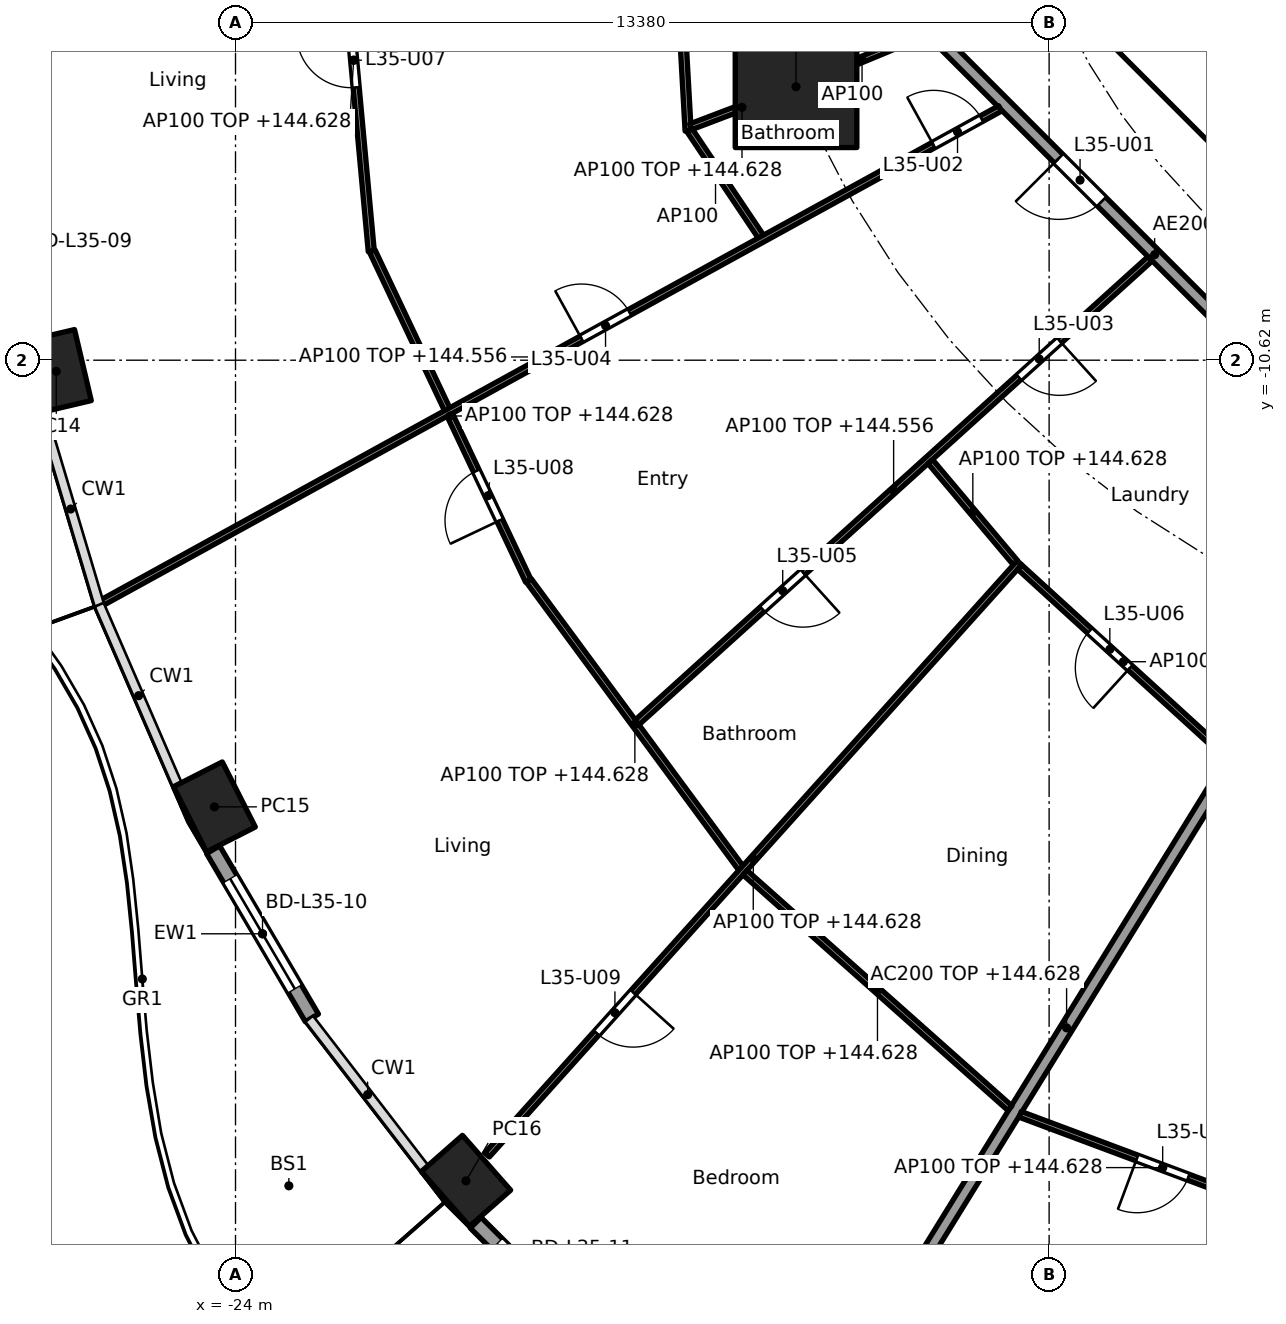
"""IFC4 building model, lengths in metres.
Left out: names, types, materials, properties, quantities, classifications, styles, units other than length and angle.
Written with IfcOpenShell. Run it as: python <this file> out.ifc"""

import sys

from ifc_helpers import new_model, si_unit, direction, frame, frame_2d, origin, origin_2d, place, context, subcontext, project, spatial, rectangle, hollow_rectangle, extrude, element, fill, save


model = new_model("IFC4")
c1 = context("Model", 3, precision=1e-05, world=origin(), true_north=direction((0.0, 1.0)))
c2 = subcontext(c1, "Body", "Model", "MODEL_VIEW")
j1 = project(units=[si_unit("LENGTHUNIT", "METRE"), si_unit("PLANEANGLEUNIT", "RADIAN")], contexts=[c1])
p1 = place(None, origin())
s1 = spatial("IfcSite", under=j1, at=p1, CompositionType="ELEMENT")
p2 = place(p1, origin())
s2 = spatial("IfcBuilding", under=s1, at=p2, CompositionType="ELEMENT")
p3 = place(p2, frame((0.0, 0.0, 141.8)))
s3 = spatial("IfcBuildingStorey", under=s2, at=p3, CompositionType="ELEMENT", Elevation=141.8)
for number, where, z_axis, x_axis in (
    (1, (-26.948, -10.803, 0.0), (0.0, 0.0, 1.0), (0.229, -0.973, 0.0)),
    (2, (-24.347, -17.965, 0.0), (0.0, 0.0, 1.0), (0.452, -0.892, 0.0)),
    (3, (-20.209, -24.115, 0.0), (0.0, 0.0, 1.0), (0.66, -0.751, 0.0)),
):
    element("IfcColumn", number, at=place(p3, frame(where, z_axis=z_axis, x_axis=x_axis)), inside=s3, PredefinedType="COLUMN", context=c2, shape_type="SweptSolid", body=[
        extrude(hollow_rectangle(XDim=1.2, YDim=0.9, WallThickness=0.04, at=origin_2d()), origin(), (0.0, 0.0, 1.0), 3.7),
    ])
p4 = place(p3, frame((-14.782, -6.123, 0.0), z_axis=(0.0, 0.0, 1.0), x_axis=(1.0, 0.0, 0.0)))
e4 = element("IfcColumn", 4, at=p4, inside=s3, PredefinedType="COLUMN", context=c2, shape_type="SweptSolid", body=[
    extrude(rectangle(XDim=2.0, YDim=2.0, at=origin_2d()), origin(), (0.0, 0.0, 1.0), 3.7),
])
p5 = place(p3, frame((-22.744, -21.436, 0.0), z_axis=(0.0, 0.0, 1.0), x_axis=(-0.506314982873, 0.862348617508, 0.0)))
e5 = element("IfcWall", 5, at=p5, inside=s3, PredefinedType="SOLIDWALL", context=c2, shape_type="SweptSolid", body=[
    extrude(rectangle(XDim=3.208, YDim=0.25, at=frame_2d((1.604, 0.0))), origin(), (0.0, 0.0, 1.0), 3.44),
])
p6 = place(p5, frame((0.554, 0.0, 0.0)))
e6 = element("IfcOpeningElement", 6, at=p6, cuts=e5, PredefinedType="OPENING", context=c2, shape_type="SweptSolid", body=[
    extrude(rectangle(XDim=2.1, YDim=2.4, at=frame_2d((1.05, 1.2))), frame((0.0, 0.135, 0.0), z_axis=(0.0, -1.0, 0.0), x_axis=(1.0, 0.0, 0.0)), (0.0, 0.0, 1.0), 0.27),
])
p7 = place(p3, frame((-17.865, -26.985, 0.0), z_axis=(0.0, 0.0, 1.0), x_axis=(-0.707818274975, 0.706394570768, 0.0)))
e7 = element("IfcWall", 7, at=p7, inside=s3, PredefinedType="SOLIDWALL", context=c2, shape_type="SweptSolid", body=[
    extrude(rectangle(XDim=3.087, YDim=0.25, at=frame_2d((1.543, 0.0))), origin(), (0.0, 0.0, 1.0), 3.44),
])
p8 = place(p7, frame((0.493, 0.0, 0.0)))
e8 = element("IfcOpeningElement", 8, at=p8, cuts=e7, PredefinedType="OPENING", context=c2, shape_type="SweptSolid", body=[
    extrude(rectangle(XDim=2.1, YDim=2.4, at=frame_2d((1.05, 1.2))), frame((0.0, 0.135, 0.0), z_axis=(0.0, -1.0, 0.0), x_axis=(1.0, 0.0, 0.0)), (0.0, 0.0, 1.0), 0.27),
])
p9 = place(p3, frame((-9.988, -4.613, 0.0), z_axis=(0.0, 0.0, 1.0), x_axis=(0.707106781187, -0.707106781187, 0.0)))
e9 = element("IfcWall", 9, at=p9, inside=s3, PredefinedType="SHEAR", context=c2, shape_type="SweptSolid", body=[
    extrude(rectangle(XDim=7.602, YDim=0.6, at=frame_2d((3.801, 0.0))), origin(), (0.0, 0.0, 1.0), 3.44),
])
p10 = place(p9, frame((6.151, 0.0, 0.0)))
e10 = element("IfcOpeningElement", 10, at=p10, cuts=e9, PredefinedType="OPENING", context=c2, shape_type="SweptSolid", body=[
    extrude(rectangle(XDim=1.1, YDim=2.1, at=frame_2d((0.55, 1.05))), frame((0.0, 0.31, 0.0), z_axis=(0.0, -1.0, 0.0), x_axis=(1.0, 0.0, 0.0)), (0.0, 0.0, 1.0), 0.62),
])
p11 = place(p3, frame((-6.149, -14.825, 0.0), z_axis=(0.0, 0.0, 1.0), x_axis=(-0.525406383516, -0.85085141603, 0.0)))
e11 = element("IfcWall", 11, at=p11, inside=s3, PredefinedType="PARTITIONING", context=c2, shape_type="SweptSolid", body=[
    extrude(rectangle(XDim=15.925, YDim=0.2, at=frame_2d((7.962, 0.0))), origin(), (0.0, 0.0, 1.0), 2.828),
])
p12 = place(p3, frame((-12.635, -5.134, 0.0), z_axis=(0.0, 0.0, 1.0), x_axis=(0.707106781187, -0.707106781187, 0.0)))
e12 = element("IfcWall", 12, at=p12, inside=s3, PredefinedType="PARTITIONING", context=c2, shape_type="SweptSolid", body=[
    extrude(rectangle(XDim=10.609, YDim=0.2, at=frame_2d((5.305, 0.0))), origin(), (0.0, 0.0, 1.0), 3.44),
])
p13 = place(p12, frame((3.07, 0.0, 0.0)))
e13 = element("IfcOpeningElement", 13, at=p13, cuts=e12, PredefinedType="OPENING", context=c2, shape_type="SweptSolid", body=[
    extrude(rectangle(XDim=1.0, YDim=2.1, at=frame_2d((0.5, 1.05))), frame((0.0, 0.11, 0.0), z_axis=(0.0, -1.0, 0.0), x_axis=(1.0, 0.0, 0.0)), (0.0, 0.0, 1.0), 0.22),
])
p14 = place(p3, frame((-16.825, -2.058, 0.0), z_axis=(0.0, 0.0, 1.0), x_axis=(0.055971643802, -0.998432358796, 0.0)))
e14 = element("IfcWall", 14, at=p14, inside=s3, PredefinedType="PARTITIONING", context=c2, shape_type="SweptSolid", body=[
    extrude(rectangle(XDim=4.798, YDim=0.1, at=frame_2d((2.399, 0.0))), origin(), (0.0, 0.0, 1.0), 2.828),
])
p15 = place(p3, frame((-22.347, -2.542, 0.0), z_axis=(0.0, 0.0, 1.0), x_axis=(0.091783634244, -0.995778973711, 0.0)))
e15 = element("IfcWall", 15, at=p15, inside=s3, PredefinedType="PARTITIONING", context=c2, shape_type="SweptSolid", body=[
    extrude(rectangle(XDim=6.315, YDim=0.1, at=frame_2d((3.157, 0.0))), origin(), (0.0, 0.0, 1.0), 2.828),
])
p16 = place(p15, frame((2.708, 0.0, 0.0)))
e16 = element("IfcOpeningElement", 16, at=p16, cuts=e15, PredefinedType="OPENING", context=c2, shape_type="SweptSolid", body=[
    extrude(rectangle(XDim=0.9, YDim=2.1, at=frame_2d((0.45, 1.05))), frame((0.0, 0.06, 0.0), z_axis=(0.0, -1.0, 0.0), x_axis=(1.0, 0.0, 0.0)), (0.0, 0.0, 1.0), 0.12),
])
p17 = place(p3, frame((-12.657, -5.243, 0.0), z_axis=(0.0, 0.0, 1.0), x_axis=(-0.923864733477, -0.382719158442, 0.0)))
e17 = element("IfcWall", 17, at=p17, inside=s3, PredefinedType="PARTITIONING", context=c2, shape_type="SweptSolid", body=[
    extrude(rectangle(XDim=2.25, YDim=0.1, at=frame_2d((1.125, 0.0))), origin(), (0.0, 0.0, 1.0), 3.44),
])
p18 = place(p3, frame((-14.829, -6.141, 0.0), z_axis=(0.0, 0.0, 1.0), x_axis=(-0.934704367514, -0.355426146128, 0.0)))
e18 = element("IfcWall", 18, at=p18, inside=s3, PredefinedType="PARTITIONING", context=c2, shape_type="SweptSolid", body=[
    extrude(rectangle(XDim=1.802, YDim=0.1, at=frame_2d((0.901, 0.0))), origin(), (0.0, 0.0, 1.0), 2.828),
])
p19 = place(p3, frame((-16.532, -6.84, 0.0), z_axis=(0.0, 0.0, 1.0), x_axis=(0.556994773624, -0.830515997531, 0.0)))
e19 = element("IfcWall", 19, at=p19, inside=s3, PredefinedType="PARTITIONING", context=c2, shape_type="SweptSolid", body=[
    extrude(rectangle(XDim=2.183, YDim=0.1, at=frame_2d((1.092, 0.0))), origin(), (0.0, 0.0, 1.0), 3.44),
])
p20 = place(p3, frame((-21.75, -8.826, 0.0), z_axis=(0.0, 0.0, 1.0), x_axis=(0.427736419988, -0.903903509793, 0.0)))
e20 = element("IfcWall", 20, at=p20, inside=s3, PredefinedType="PARTITIONING", context=c2, shape_type="SweptSolid", body=[
    extrude(rectangle(XDim=5.999, YDim=0.1, at=frame_2d((3.0, 0.0))), origin(), (0.0, 0.0, 1.0), 2.828),
])
p21 = place(p20, frame((3.999, 0.0, 0.0)))
e21 = element("IfcOpeningElement", 21, at=p21, cuts=e20, PredefinedType="OPENING", context=c2, shape_type="SweptSolid", body=[
    extrude(rectangle(XDim=0.9, YDim=2.1, at=frame_2d((0.45, 1.05))), frame((0.0, 0.06, 0.0), z_axis=(0.0, -1.0, 0.0), x_axis=(1.0, 0.0, 0.0)), (0.0, 0.0, 1.0), 0.12),
])
p22 = place(p3, frame((-11.426, -6.479, 0.0), z_axis=(0.0, 0.0, 1.0), x_axis=(-0.876110392495, -0.482110547657, 0.0)))
e22 = element("IfcWall", 22, at=p22, inside=s3, PredefinedType="PARTITIONING", context=c2, shape_type="SweptSolid", body=[
    extrude(rectangle(XDim=16.955, YDim=0.1, at=frame_2d((8.478, 0.0))), origin(), (0.0, 0.0, 1.0), 2.756),
])
p23 = place(p22, frame((0.35, 0.0, 0.0)))
e23 = element("IfcOpeningElement", 23, at=p23, cuts=e22, PredefinedType="OPENING", context=c2, shape_type="SweptSolid", body=[
    extrude(rectangle(XDim=0.9, YDim=2.1, at=frame_2d((0.45, 1.05))), frame((0.0, 0.06, 0.0), z_axis=(0.0, -1.0, 0.0), x_axis=(1.0, 0.0, 0.0)), (0.0, 0.0, 1.0), 0.12),
])
p24 = place(p22, frame((6.957, 0.0, 0.0)))
e24 = element("IfcOpeningElement", 24, at=p24, cuts=e22, PredefinedType="OPENING", context=c2, shape_type="SweptSolid", body=[
    extrude(rectangle(XDim=0.9, YDim=2.1, at=frame_2d((0.45, 1.05))), frame((0.0, 0.06, 0.0), z_axis=(0.0, -1.0, 0.0), x_axis=(1.0, 0.0, 0.0)), (0.0, 0.0, 1.0), 0.12),
])
p25 = place(p3, frame((-19.176, -14.244, 0.0), z_axis=(0.0, 0.0, 1.0), x_axis=(0.593532053206, -0.80481035146, 0.0)))
e25 = element("IfcWall", 25, at=p25, inside=s3, PredefinedType="PARTITIONING", context=c2, shape_type="SweptSolid", body=[
    extrude(rectangle(XDim=5.876, YDim=0.1, at=frame_2d((2.938, 0.0))), origin(), (0.0, 0.0, 1.0), 2.828),
])
p26 = place(p3, frame((-8.959, -8.952, 0.0), z_axis=(0.0, 0.0, 1.0), x_axis=(-0.741982736283, -0.670418987692, 0.0)))
e26 = element("IfcWall", 26, at=p26, inside=s3, PredefinedType="PARTITIONING", context=c2, shape_type="SweptSolid", body=[
    extrude(rectangle(XDim=11.371, YDim=0.1, at=frame_2d((5.685, 0.0))), origin(), (0.0, 0.0, 1.0), 2.756),
])
p27 = place(p26, frame((2.009, 0.0, 0.0)))
e27 = element("IfcOpeningElement", 27, at=p27, cuts=e26, PredefinedType="OPENING", context=c2, shape_type="SweptSolid", body=[
    extrude(rectangle(XDim=0.9, YDim=2.1, at=frame_2d((0.45, 1.05))), frame((0.0, 0.06, 0.0), z_axis=(0.0, -1.0, 0.0), x_axis=(1.0, 0.0, 0.0)), (0.0, 0.0, 1.0), 0.12),
])
p28 = place(p26, frame((7.694, 0.0, 0.0)))
e28 = element("IfcOpeningElement", 28, at=p28, cuts=e26, PredefinedType="OPENING", context=c2, shape_type="SweptSolid", body=[
    extrude(rectangle(XDim=0.9, YDim=2.1, at=frame_2d((0.45, 1.05))), frame((0.0, 0.06, 0.0), z_axis=(0.0, -1.0, 0.0), x_axis=(1.0, 0.0, 0.0)), (0.0, 0.0, 1.0), 0.12),
])
p29 = place(p3, frame((-12.575, -12.286, 0.0), z_axis=(0.0, 0.0, 1.0), x_axis=(0.644052758448, -0.764981074495, 0.0)))
e29 = element("IfcWall", 29, at=p29, inside=s3, PredefinedType="PARTITIONING", context=c2, shape_type="SweptSolid", body=[
    extrude(rectangle(XDim=2.174, YDim=0.1, at=frame_2d((1.087, 0.0))), origin(), (0.0, 0.0, 1.0), 2.828),
])
p30 = place(p3, frame((-11.109, -13.951, 0.0), z_axis=(0.0, 0.0, 1.0), x_axis=(-0.668488676691, -0.743722319913, 0.0)))
e30 = element("IfcWall", 30, at=p30, inside=s3, PredefinedType="PARTITIONING", context=c2, shape_type="SweptSolid", body=[
    extrude(rectangle(XDim=13.094, YDim=0.1, at=frame_2d((6.547, 0.0))), origin(), (0.0, 0.0, 1.0), 2.828),
])
p31 = place(p30, frame((9.5, 0.0, 0.0)))
e31 = element("IfcOpeningElement", 31, at=p31, cuts=e30, PredefinedType="OPENING", context=c2, shape_type="SweptSolid", body=[
    extrude(rectangle(XDim=0.9, YDim=2.1, at=frame_2d((0.45, 1.05))), frame((0.0, 0.06, 0.0), z_axis=(0.0, -1.0, 0.0), x_axis=(1.0, 0.0, 0.0)), (0.0, 0.0, 1.0), 0.12),
])
p32 = place(p3, frame((-11.105, -14.021, 0.0), z_axis=(0.0, 0.0, 1.0), x_axis=(0.738880014758, -0.673837015747, 0.0)))
e32 = element("IfcWall", 32, at=p32, inside=s3, PredefinedType="PARTITIONING", context=c2, shape_type="SweptSolid", body=[
    extrude(rectangle(XDim=4.621, YDim=0.1, at=frame_2d((2.31, 0.0))), origin(), (0.0, 0.0, 1.0), 2.828),
])
p33 = place(p32, frame((1.558, 0.0, 0.0)))
e33 = element("IfcOpeningElement", 33, at=p33, cuts=e32, PredefinedType="OPENING", context=c2, shape_type="SweptSolid", body=[
    extrude(rectangle(XDim=0.9, YDim=2.1, at=frame_2d((0.45, 1.05))), frame((0.0, 0.06, 0.0), z_axis=(0.0, -1.0, 0.0), x_axis=(1.0, 0.0, 0.0)), (0.0, 0.0, 1.0), 0.12),
])
p34 = place(p3, frame((-15.622, -19.046, 0.0), z_axis=(0.0, 0.0, 1.0), x_axis=(0.747342322463, -0.664439201925, 0.0)))
e34 = element("IfcWall", 34, at=p34, inside=s3, PredefinedType="PARTITIONING", context=c2, shape_type="SweptSolid", body=[
    extrude(rectangle(XDim=5.831, YDim=0.1, at=frame_2d((2.916, 0.0))), origin(), (0.0, 0.0, 1.0), 2.828),
])
p35 = place(p3, frame((-11.096, -23.022, 0.0), z_axis=(0.0, 0.0, 1.0), x_axis=(0.936725688471, -0.350064257758, 0.0)))
e35 = element("IfcWall", 35, at=p35, inside=s3, PredefinedType="PARTITIONING", context=c2, shape_type="SweptSolid", body=[
    extrude(rectangle(XDim=5.003, YDim=0.1, at=frame_2d((2.501, 0.0))), origin(), (0.0, 0.0, 1.0), 2.828),
])
p36 = place(p35, frame((2.051, 0.0, 0.0)))
e36 = element("IfcOpeningElement", 36, at=p36, cuts=e35, PredefinedType="OPENING", context=c2, shape_type="SweptSolid", body=[
    extrude(rectangle(XDim=0.9, YDim=2.1, at=frame_2d((0.45, 1.05))), frame((0.0, 0.06, 0.0), z_axis=(0.0, -1.0, 0.0), x_axis=(1.0, 0.0, 0.0)), (0.0, 0.0, 1.0), 0.12),
])
p37 = place(p6, origin())
e37 = element("IfcDoor", 37, at=p37, inside=s3, OperationType="SLIDING_TO_LEFT", PredefinedType="DOOR", context=c2, shape_type="SweptSolid", body=[
    extrude(rectangle(XDim=2.1, YDim=2.4, at=frame_2d((1.05, 1.2))), frame((0.0, 0.025, 0.0), z_axis=(0.0, -1.0, 0.0), x_axis=(1.0, 0.0, 0.0)), (0.0, 0.0, 1.0), 0.05),
])
fill(e6, e37)
p38 = place(p8, origin())
e38 = element("IfcDoor", 38, at=p38, inside=s3, OperationType="SLIDING_TO_LEFT", PredefinedType="DOOR", context=c2, shape_type="SweptSolid", body=[
    extrude(rectangle(XDim=2.1, YDim=2.4, at=frame_2d((1.05, 1.2))), frame((0.0, 0.025, 0.0), z_axis=(0.0, -1.0, 0.0), x_axis=(1.0, 0.0, 0.0)), (0.0, 0.0, 1.0), 0.05),
])
fill(e8, e38)
p39 = place(p13, frame((1.0, 0.0, 0.0), x_axis=(-1.0, 0.0, 0.0)))
e39 = element("IfcDoor", 39, at=p39, inside=s3, OperationType="SINGLE_SWING_RIGHT", PredefinedType="DOOR", context=c2, shape_type="SweptSolid", body=[
    extrude(rectangle(XDim=1.0, YDim=2.1, at=frame_2d((0.5, 1.05))), frame((0.0, 0.025, 0.0), z_axis=(0.0, -1.0, 0.0), x_axis=(1.0, 0.0, 0.0)), (0.0, 0.0, 1.0), 0.05),
])
fill(e13, e39)
p40 = place(p23, frame((0.9, 0.0, 0.0), x_axis=(-1.0, 0.0, 0.0)))
e40 = element("IfcDoor", 40, at=p40, inside=s3, OperationType="SINGLE_SWING_LEFT", PredefinedType="DOOR", context=c2, shape_type="SweptSolid", body=[
    extrude(rectangle(XDim=0.9, YDim=2.1, at=frame_2d((0.45, 1.05))), frame((0.0, 0.025, 0.0), z_axis=(0.0, -1.0, 0.0), x_axis=(1.0, 0.0, 0.0)), (0.0, 0.0, 1.0), 0.05),
])
fill(e23, e40)
p41 = place(p27, origin())
e41 = element("IfcDoor", 41, at=p41, inside=s3, OperationType="SINGLE_SWING_LEFT", PredefinedType="DOOR", context=c2, shape_type="SweptSolid", body=[
    extrude(rectangle(XDim=0.9, YDim=2.1, at=frame_2d((0.45, 1.05))), frame((0.0, 0.025, 0.0), z_axis=(0.0, -1.0, 0.0), x_axis=(1.0, 0.0, 0.0)), (0.0, 0.0, 1.0), 0.05),
])
fill(e27, e41)
p42 = place(p24, frame((0.9, 0.0, 0.0), x_axis=(-1.0, 0.0, 0.0)))
e42 = element("IfcDoor", 42, at=p42, inside=s3, OperationType="SINGLE_SWING_LEFT", PredefinedType="DOOR", context=c2, shape_type="SweptSolid", body=[
    extrude(rectangle(XDim=0.9, YDim=2.1, at=frame_2d((0.45, 1.05))), frame((0.0, 0.025, 0.0), z_axis=(0.0, -1.0, 0.0), x_axis=(1.0, 0.0, 0.0)), (0.0, 0.0, 1.0), 0.05),
])
fill(e24, e42)
p43 = place(p28, origin())
e43 = element("IfcDoor", 43, at=p43, inside=s3, OperationType="SINGLE_SWING_LEFT", PredefinedType="DOOR", context=c2, shape_type="SweptSolid", body=[
    extrude(rectangle(XDim=0.9, YDim=2.1, at=frame_2d((0.45, 1.05))), frame((0.0, 0.025, 0.0), z_axis=(0.0, -1.0, 0.0), x_axis=(1.0, 0.0, 0.0)), (0.0, 0.0, 1.0), 0.05),
])
fill(e28, e43)
p44 = place(p33, frame((0.9, 0.0, 0.0), x_axis=(-1.0, 0.0, 0.0)))
e44 = element("IfcDoor", 44, at=p44, inside=s3, OperationType="SINGLE_SWING_LEFT", PredefinedType="DOOR", context=c2, shape_type="SweptSolid", body=[
    extrude(rectangle(XDim=0.9, YDim=2.1, at=frame_2d((0.45, 1.05))), frame((0.0, 0.025, 0.0), z_axis=(0.0, -1.0, 0.0), x_axis=(1.0, 0.0, 0.0)), (0.0, 0.0, 1.0), 0.05),
])
fill(e33, e44)
p45 = place(p16, frame((0.9, 0.0, 0.0), x_axis=(-1.0, 0.0, 0.0)))
e45 = element("IfcDoor", 45, at=p45, inside=s3, OperationType="SINGLE_SWING_RIGHT", PredefinedType="DOOR", context=c2, shape_type="SweptSolid", body=[
    extrude(rectangle(XDim=0.9, YDim=2.1, at=frame_2d((0.45, 1.05))), frame((0.0, 0.025, 0.0), z_axis=(0.0, -1.0, 0.0), x_axis=(1.0, 0.0, 0.0)), (0.0, 0.0, 1.0), 0.05),
])
fill(e16, e45)
p46 = place(p21, frame((0.9, 0.0, 0.0), x_axis=(-1.0, 0.0, 0.0)))
e46 = element("IfcDoor", 46, at=p46, inside=s3, OperationType="SINGLE_SWING_LEFT", PredefinedType="DOOR", context=c2, shape_type="SweptSolid", body=[
    extrude(rectangle(XDim=0.9, YDim=2.1, at=frame_2d((0.45, 1.05))), frame((0.0, 0.025, 0.0), z_axis=(0.0, -1.0, 0.0), x_axis=(1.0, 0.0, 0.0)), (0.0, 0.0, 1.0), 0.05),
])
fill(e21, e46)
p47 = place(p31, origin())
e47 = element("IfcDoor", 47, at=p47, inside=s3, OperationType="SINGLE_SWING_LEFT", PredefinedType="DOOR", context=c2, shape_type="SweptSolid", body=[
    extrude(rectangle(XDim=0.9, YDim=2.1, at=frame_2d((0.45, 1.05))), frame((0.0, 0.025, 0.0), z_axis=(0.0, -1.0, 0.0), x_axis=(1.0, 0.0, 0.0)), (0.0, 0.0, 1.0), 0.05),
])
fill(e31, e47)
p48 = place(p36, frame((0.9, 0.0, 0.0), x_axis=(-1.0, 0.0, 0.0)))
e48 = element("IfcDoor", 48, at=p48, inside=s3, OperationType="SINGLE_SWING_RIGHT", PredefinedType="DOOR", context=c2, shape_type="SweptSolid", body=[
    extrude(rectangle(XDim=0.9, YDim=2.1, at=frame_2d((0.45, 1.05))), frame((0.0, 0.025, 0.0), z_axis=(0.0, -1.0, 0.0), x_axis=(1.0, 0.0, 0.0)), (0.0, 0.0, 1.0), 0.05),
])
fill(e36, e48)
save(model, sys.argv[1])
